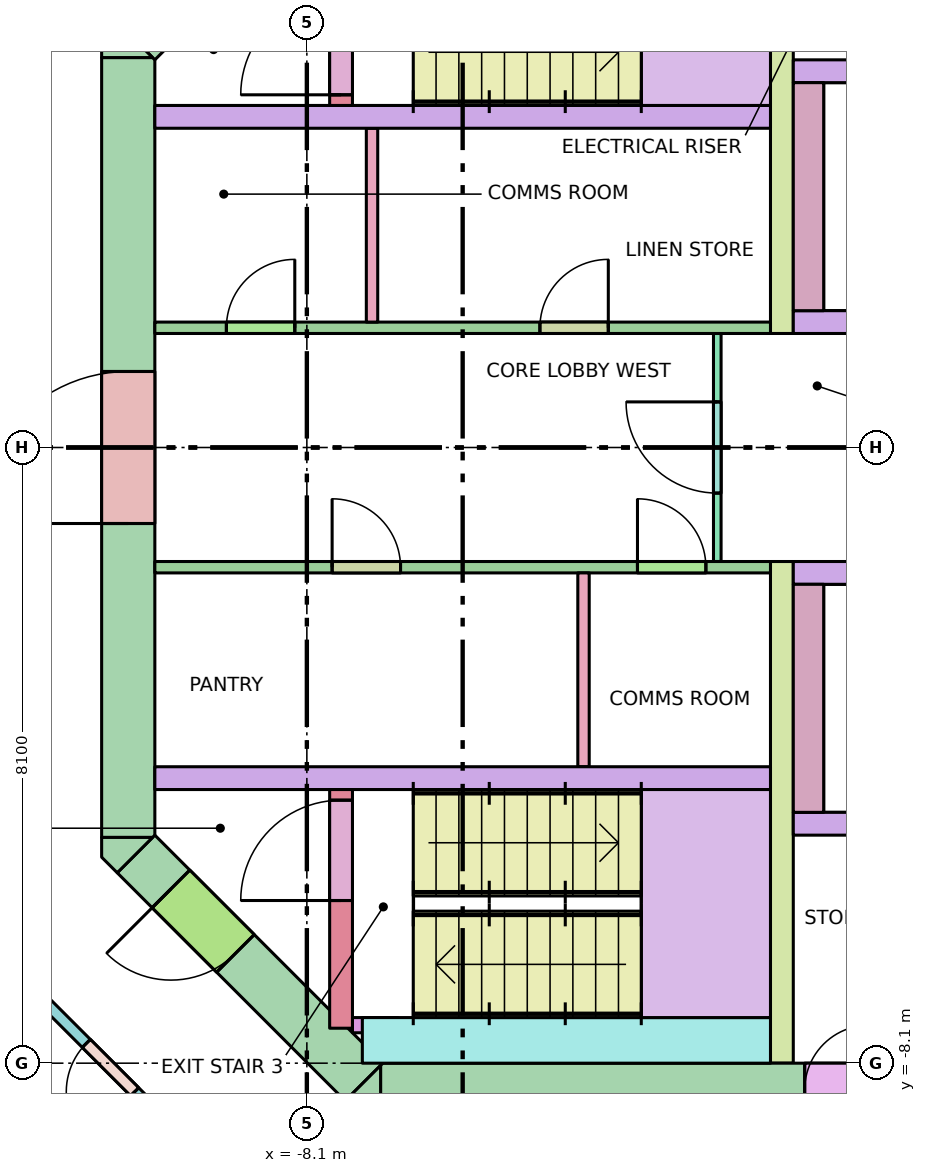
"""IFC4 building model, lengths in metres.
Left out: names, types, materials, properties, quantities, classifications, styles, units other than length and angle.
Written with IfcOpenShell. Run it as: python <this file> out.ifc"""

import sys

from ifc_helpers import new_model, si_unit, direction, frame, frame_2d, origin, place, context, subcontext, project, spatial, polyline, rectangle, outline, extrude, element, fill, save


model = new_model("IFC4")
c1 = context("Model", 3, precision=1e-05, world=origin(), true_north=direction((0.0, 1.0)))
c2 = subcontext(c1, "Body", "Model", "MODEL_VIEW")
j1 = project(units=[si_unit("LENGTHUNIT", "METRE"), si_unit("PLANEANGLEUNIT", "RADIAN")], contexts=[c1])
p1 = place(None, origin())
s1 = spatial("IfcSite", under=j1, at=p1, CompositionType="ELEMENT")
p2 = place(p1, origin())
s2 = spatial("IfcBuilding", under=s1, at=p2, CompositionType="ELEMENT")
p3 = place(p2, frame((0.0, 0.0, 226.1)))
s3 = spatial("IfcBuildingStorey", under=s2, at=p3, CompositionType="ELEMENT", Elevation=226.1)
p4 = place(p3, frame((-7.13, -8.45, -0.28), z_axis=(0.0, 0.0, 1.0), x_axis=(1.0, 0.0, 0.0)))
e1 = element("IfcWall", 1, at=p4, inside=s3, PredefinedType="SHEAR", context=c2, shape_type="SweptSolid", body=[
    extrude(rectangle(XDim=14.26, YDim=0.7, at=frame_2d((7.13, 0.0))), origin(), (0.0, 0.0, 1.0), 3.7),
])
p5 = place(p4, frame((8.08, 0.0, 0.28)))
e2 = element("IfcOpeningElement", 2, at=p5, cuts=e1, PredefinedType="OPENING", context=c2, shape_type="SweptSolid", body=[
    extrude(rectangle(XDim=0.7, YDim=2.1, at=frame_2d((0.35, 1.05))), frame((0.0, 0.36, 0.0), z_axis=(0.0, -1.0, 0.0), x_axis=(1.0, 0.0, 0.0)), (0.0, 0.0, 1.0), 0.72),
])
p6 = place(p4, frame((5.58, 0.0, 0.28)))
e3 = element("IfcOpeningElement", 3, at=p6, cuts=e1, PredefinedType="OPENING", context=c2, shape_type="SweptSolid", body=[
    extrude(rectangle(XDim=0.85, YDim=2.1, at=frame_2d((0.425, 1.05))), frame((0.0, 0.36, 0.0), z_axis=(0.0, -1.0, 0.0), x_axis=(1.0, 0.0, 0.0)), (0.0, 0.0, 1.0), 0.72),
])
p7 = place(p4, frame((6.88, 0.0, 0.28)))
e4 = element("IfcOpeningElement", 4, at=p7, cuts=e1, PredefinedType="OPENING", context=c2, shape_type="SweptSolid", body=[
    extrude(rectangle(XDim=0.85, YDim=2.1, at=frame_2d((0.425, 1.05))), frame((0.0, 0.36, 0.0), z_axis=(0.0, -1.0, 0.0), x_axis=(1.0, 0.0, 0.0)), (0.0, 0.0, 1.0), 0.72),
])
p8 = place(p4, frame((9.445, 0.0, 0.28)))
e5 = element("IfcOpeningElement", 5, at=p8, cuts=e1, PredefinedType="OPENING", context=c2, shape_type="SweptSolid", body=[
    extrude(rectangle(XDim=0.9, YDim=2.1, at=frame_2d((0.45, 1.05))), frame((0.0, 0.36, 0.0), z_axis=(0.0, -1.0, 0.0), x_axis=(1.0, 0.0, 0.0)), (0.0, 0.0, 1.0), 0.72),
])
p9 = place(p4, frame((11.431, 0.0, 0.28)))
e6 = element("IfcOpeningElement", 6, at=p9, cuts=e1, PredefinedType="OPENING", context=c2, shape_type="SweptSolid", body=[
    extrude(rectangle(XDim=0.9, YDim=2.1, at=frame_2d((0.45, 1.05))), frame((0.0, 0.36, 0.0), z_axis=(0.0, -1.0, 0.0), x_axis=(1.0, 0.0, 0.0)), (0.0, 0.0, 1.0), 0.72),
])
p10 = place(p3, frame((-10.45, -5.13, -0.28), z_axis=(0.0, 0.0, 1.0), x_axis=(0.0, 1.0, 0.0)))
e7 = element("IfcWall", 7, at=p10, inside=s3, PredefinedType="SHEAR", context=c2, shape_type="SweptSolid", body=[
    extrude(rectangle(XDim=10.26, YDim=0.7, at=frame_2d((5.13, 0.0))), origin(), (0.0, 0.0, 1.0), 3.7),
])
p11 = place(p10, frame((4.13, 0.0, 0.28)))
e8 = element("IfcOpeningElement", 8, at=p11, cuts=e7, PredefinedType="OPENING", context=c2, shape_type="SweptSolid", body=[
    extrude(rectangle(XDim=2.0, YDim=2.1, at=frame_2d((1.0, 1.05))), frame((0.0, 0.36, 0.0), z_axis=(0.0, -1.0, 0.0), x_axis=(1.0, 0.0, 0.0)), (0.0, 0.0, 1.0), 0.72),
])
p12 = place(p3, frame((-10.347, 5.347, -0.28), z_axis=(0.0, 0.0, 1.0), x_axis=(0.707106781187, 0.707106781187, 0.0)))
e9 = element("IfcWall", 9, at=p12, inside=s3, PredefinedType="SHEAR", context=c2, shape_type="SweptSolid", body=[
    extrude(rectangle(XDim=4.243, YDim=0.7, at=frame_2d((2.121, 0.0))), origin(), (0.0, 0.0, 1.0), 3.7),
])
p13 = place(p12, frame((0.65, 0.0, 0.28)))
e10 = element("IfcOpeningElement", 10, at=p13, cuts=e9, PredefinedType="OPENING", context=c2, shape_type="SweptSolid", body=[
    extrude(rectangle(XDim=1.2, YDim=2.1, at=frame_2d((0.6, 1.05))), frame((0.0, 0.36, 0.0), z_axis=(0.0, -1.0, 0.0), x_axis=(1.0, 0.0, 0.0)), (0.0, 0.0, 1.0), 0.72),
])
p14 = place(p3, frame((-7.347, -8.347, -0.28), z_axis=(0.0, 0.0, 1.0), x_axis=(-0.707106781187, 0.707106781187, 0.0)))
e11 = element("IfcWall", 11, at=p14, inside=s3, PredefinedType="SHEAR", context=c2, shape_type="SweptSolid", body=[
    extrude(rectangle(XDim=4.243, YDim=0.7, at=frame_2d((2.121, 0.0))), origin(), (0.0, 0.0, 1.0), 3.7),
])
p15 = place(p14, frame((2.393, 0.0, 0.28)))
e12 = element("IfcOpeningElement", 12, at=p15, cuts=e11, PredefinedType="OPENING", context=c2, shape_type="SweptSolid", body=[
    extrude(rectangle(XDim=1.2, YDim=2.1, at=frame_2d((0.6, 1.05))), frame((0.0, 0.36, 0.0), z_axis=(0.0, -1.0, 0.0), x_axis=(1.0, 0.0, 0.0)), (0.0, 0.0, 1.0), 0.72),
])
p16 = place(p3, frame((0.0, 0.0, -0.28)))
e13 = element("IfcWall", 13, at=p16, inside=s3, PredefinedType="SHEAR", context=c2, shape_type="SweptSolid", body=[
    extrude(outline(polyline([(-7.39, -8.8), (-7.595, -8.595), (-7.595, -8.595), (-7.595, -8.595), (-7.13, -8.13), (-7.13, -8.8), (-7.13, -8.8), (-7.39, -8.8)])), origin(), (0.0, 0.0, 1.0), 3.7),
])
p17 = place(p3, frame((0.0, 0.0, -0.28)))
e14 = element("IfcWall", 14, at=p17, inside=s3, PredefinedType="SHEAR", context=c2, shape_type="SweptSolid", body=[
    extrude(outline(polyline([(-10.8, -5.39), (-10.8, -5.13), (-10.8, -5.13), (-10.13, -5.13), (-10.595, -5.595), (-10.595, -5.595), (-10.595, -5.595), (-10.8, -5.39)])), origin(), (0.0, 0.0, 1.0), 3.7),
])
p18 = place(p3, frame((0.0, 0.0, -0.28)))
e15 = element("IfcWall", 15, at=p18, inside=s3, PredefinedType="SHEAR", context=c2, shape_type="SweptSolid", body=[
    extrude(outline(polyline([(-10.595, 5.595), (-10.595, 5.595), (-10.595, 5.595), (-10.13, 5.13), (-10.8, 5.13), (-10.8, 5.13), (-10.8, 5.39), (-10.595, 5.595)])), origin(), (0.0, 0.0, 1.0), 3.7),
])
for number, where, z_axis, x_axis in (
    (16, (-10.1, 4.35, 0.0), (0.0, 0.0, 1.0), (1.0, 0.0, 0.0)),
    (17, (-10.1, -4.35, 0.0), (0.0, 0.0, 1.0), (1.0, 0.0, 0.0)),
):
    element("IfcWall", number, at=place(p3, frame(where, z_axis=z_axis, x_axis=x_axis)), inside=s3, PredefinedType="SOLIDWALL", context=c2, shape_type="SweptSolid", body=[
        extrude(rectangle(XDim=8.1, YDim=0.3, at=frame_2d((4.05, 0.0))), origin(), (0.0, 0.0, 1.0), 3.42),
    ])
for number, where, z_axis, x_axis in (
    (18, (-1.85, 1.5, 0.0), (0.0, 0.0, 1.0), (0.0, 1.0, 0.0)),
    (19, (-1.85, -8.1, 0.0), (0.0, 0.0, 1.0), (0.0, 1.0, 0.0)),
):
    element("IfcWall", number, at=place(p3, frame(where, z_axis=z_axis, x_axis=x_axis)), inside=s3, PredefinedType="SHEAR", context=c2, shape_type="SweptSolid", body=[
        extrude(rectangle(XDim=6.6, YDim=0.3, at=frame_2d((3.3, 0.0))), origin(), (0.0, 0.0, 1.0), 3.42),
    ])
p19 = place(p3, frame((-1.7, 1.65, 0.0), z_axis=(0.0, 0.0, 1.0), x_axis=(1.0, 0.0, 0.0)))
e20 = element("IfcWall", 20, at=p19, inside=s3, PredefinedType="SOLIDWALL", context=c2, shape_type="SweptSolid", body=[
    extrude(rectangle(XDim=3.4, YDim=0.3, at=frame_2d((1.7, 0.0))), origin(), (0.0, 0.0, 1.0), 3.42),
])
p20 = place(p19, frame((1.15, 0.0, 0.0)))
e21 = element("IfcOpeningElement", 21, at=p20, cuts=e20, PredefinedType="OPENING", context=c2, shape_type="SweptSolid", body=[
    extrude(rectangle(XDim=1.1, YDim=2.1, at=frame_2d((0.55, 1.05))), frame((0.0, 0.16, 0.0), z_axis=(0.0, -1.0, 0.0), x_axis=(1.0, 0.0, 0.0)), (0.0, 0.0, 1.0), 0.32),
])
p21 = place(p3, frame((-1.7, -1.65, 0.0), z_axis=(0.0, 0.0, 1.0), x_axis=(1.0, 0.0, 0.0)))
e22 = element("IfcWall", 22, at=p21, inside=s3, PredefinedType="SOLIDWALL", context=c2, shape_type="SweptSolid", body=[
    extrude(rectangle(XDim=3.4, YDim=0.3, at=frame_2d((1.7, 0.0))), origin(), (0.0, 0.0, 1.0), 3.42),
])
p22 = place(p21, frame((1.15, 0.0, 0.0)))
e23 = element("IfcOpeningElement", 23, at=p22, cuts=e22, PredefinedType="OPENING", context=c2, shape_type="SweptSolid", body=[
    extrude(rectangle(XDim=1.1, YDim=2.1, at=frame_2d((0.55, 1.05))), frame((0.0, 0.16, 0.0), z_axis=(0.0, -1.0, 0.0), x_axis=(1.0, 0.0, 0.0)), (0.0, 0.0, 1.0), 0.32),
])
for number, where, z_axis, x_axis in (
    (24, (-1.5, 1.8, 0.0), (0.0, 0.0, 1.0), (0.0, 1.0, 0.0)),
    (25, (-1.5, -4.8, 0.0), (0.0, 0.0, 1.0), (0.0, 1.0, 0.0)),
):
    element("IfcWall", number, at=place(p3, frame(where, z_axis=z_axis, x_axis=x_axis)), inside=s3, PredefinedType="SOLIDWALL", context=c2, shape_type="SweptSolid", body=[
        extrude(rectangle(XDim=3.0, YDim=0.4, at=frame_2d((1.5, 0.0))), origin(), (0.0, 0.0, 1.0), 3.42),
    ])
for number, where, z_axis, x_axis in (
    (26, (-1.7, 4.95, 0.0), (0.0, 0.0, 1.0), (1.0, 0.0, 0.0)),
    (27, (-1.7, -4.95, 0.0), (0.0, 0.0, 1.0), (1.0, 0.0, 0.0)),
):
    element("IfcWall", number, at=place(p3, frame(where, z_axis=z_axis, x_axis=x_axis)), inside=s3, PredefinedType="SOLIDWALL", context=c2, shape_type="SweptSolid", body=[
        extrude(rectangle(XDim=3.4, YDim=0.3, at=frame_2d((1.7, 0.0))), origin(), (0.0, 0.0, 1.0), 3.42),
    ])
p23 = place(p3, frame((-7.65, 4.5, 0.0), z_axis=(0.0, 0.0, 1.0), x_axis=(0.0, 1.0, 0.0)))
e28 = element("IfcWall", 28, at=p23, inside=s3, PredefinedType="SHEAR", context=c2, shape_type="SweptSolid", body=[
    extrude(rectangle(XDim=3.14, YDim=0.3, at=frame_2d((1.57, 0.0))), origin(), (0.0, 0.0, 1.0), 3.42),
])
p24 = place(p23, frame((0.14, 0.0, 0.0)))
e29 = element("IfcOpeningElement", 29, at=p24, cuts=e28, PredefinedType="OPENING", context=c2, shape_type="SweptSolid", body=[
    extrude(rectangle(XDim=1.32, YDim=2.1, at=frame_2d((0.66, 1.05))), frame((0.0, 0.16, 0.0), z_axis=(0.0, -1.0, 0.0), x_axis=(1.0, 0.0, 0.0)), (0.0, 0.0, 1.0), 0.32),
])
p25 = place(p3, frame((-7.65, -7.64, 0.0), z_axis=(0.0, 0.0, 1.0), x_axis=(0.0, 1.0, 0.0)))
e30 = element("IfcWall", 30, at=p25, inside=s3, PredefinedType="SHEAR", context=c2, shape_type="SweptSolid", body=[
    extrude(rectangle(XDim=3.14, YDim=0.3, at=frame_2d((1.57, 0.0))), origin(), (0.0, 0.0, 1.0), 3.42),
])
p26 = place(p25, frame((1.68, 0.0, 0.0)))
e31 = element("IfcOpeningElement", 31, at=p26, cuts=e30, PredefinedType="OPENING", context=c2, shape_type="SweptSolid", body=[
    extrude(rectangle(XDim=1.32, YDim=2.1, at=frame_2d((0.66, 1.05))), frame((0.0, 0.16, 0.0), z_axis=(0.0, -1.0, 0.0), x_axis=(1.0, 0.0, 0.0)), (0.0, 0.0, 1.0), 0.32),
])
p27 = place(p3, frame((-7.5, -7.6, 0.0), z_axis=(0.0, 0.0, 1.0), x_axis=(1.0, 0.0, 0.0)))
e32 = element("IfcWall", 32, at=p27, inside=s3, PredefinedType="SHEAR", context=c2, shape_type="SweptSolid", body=[
    extrude(rectangle(XDim=0.6, YDim=0.2, at=frame_2d((0.3, 0.0))), origin(), (0.0, 0.0, 1.0), 3.42),
])
p28 = place(p3, frame((-7.37, -7.8, 0.0), z_axis=(0.0, 0.0, 1.0), x_axis=(1.0, 0.0, 0.0)))
e33 = element("IfcWall", 33, at=p28, inside=s3, PredefinedType="SHEAR", context=c2, shape_type="SweptSolid", body=[
    extrude(rectangle(XDim=5.37, YDim=0.6, at=frame_2d((2.685, 0.0))), origin(), (0.0, 0.0, 1.0), 3.42),
])
p29 = place(p3, frame((-2.7, -1.5, 0.0), z_axis=(0.0, 0.0, 1.0), x_axis=(0.0, 1.0, 0.0)))
e34 = element("IfcWall", 34, at=p29, inside=s3, PredefinedType="PARTITIONING", context=c2, shape_type="SweptSolid", body=[
    extrude(rectangle(XDim=3.0, YDim=0.1, at=frame_2d((1.5, 0.0))), origin(), (0.0, 0.0, 1.0), 3.42),
])
p30 = place(p29, frame((0.9, 0.0, 0.0)))
e35 = element("IfcOpeningElement", 35, at=p30, cuts=e34, PredefinedType="OPENING", context=c2, shape_type="SweptSolid", body=[
    extrude(rectangle(XDim=1.2, YDim=2.1, at=frame_2d((0.6, 1.05))), frame((0.0, 0.06, 0.0), z_axis=(0.0, -1.0, 0.0), x_axis=(1.0, 0.0, 0.0)), (0.0, 0.0, 1.0), 0.12),
])
for number, where, z_axis, x_axis in (
    (36, (-7.242, 1.65, 0.0), (0.0, 0.0, 1.0), (0.0, 1.0, 0.0)),
    (37, (-4.46, -4.2, 0.0), (0.0, 0.0, 1.0), (0.0, 1.0, 0.0)),
):
    element("IfcWall", number, at=place(p3, frame(where, z_axis=z_axis, x_axis=x_axis)), inside=s3, PredefinedType="PARTITIONING", context=c2, shape_type="SweptSolid", body=[
        extrude(rectangle(XDim=2.55, YDim=0.15, at=frame_2d((1.275, 0.0))), origin(), (0.0, 0.0, 1.0), 3.42),
    ])
p31 = place(p3, frame((-10.1, 1.575, 0.0), z_axis=(0.0, 0.0, 1.0), x_axis=(1.0, 0.0, 0.0)))
e38 = element("IfcWall", 38, at=p31, inside=s3, PredefinedType="PARTITIONING", context=c2, shape_type="SweptSolid", body=[
    extrude(rectangle(XDim=8.1, YDim=0.15, at=frame_2d((4.05, 0.0))), origin(), (0.0, 0.0, 1.0), 3.42),
])
p32 = place(p31, frame((0.941, 0.0, 0.0)))
e39 = element("IfcOpeningElement", 39, at=p32, cuts=e38, PredefinedType="OPENING", context=c2, shape_type="SweptSolid", body=[
    extrude(rectangle(XDim=0.9, YDim=2.1, at=frame_2d((0.45, 1.05))), frame((0.0, 0.085, 0.0), z_axis=(0.0, -1.0, 0.0), x_axis=(1.0, 0.0, 0.0)), (0.0, 0.0, 1.0), 0.17),
])
p33 = place(p31, frame((5.066, 0.0, 0.0)))
e40 = element("IfcOpeningElement", 40, at=p33, cuts=e38, PredefinedType="OPENING", context=c2, shape_type="SweptSolid", body=[
    extrude(rectangle(XDim=0.9, YDim=2.1, at=frame_2d((0.45, 1.05))), frame((0.0, 0.085, 0.0), z_axis=(0.0, -1.0, 0.0), x_axis=(1.0, 0.0, 0.0)), (0.0, 0.0, 1.0), 0.17),
])
p34 = place(p3, frame((-10.1, -1.575, 0.0), z_axis=(0.0, 0.0, 1.0), x_axis=(1.0, 0.0, 0.0)))
e41 = element("IfcWall", 41, at=p34, inside=s3, PredefinedType="PARTITIONING", context=c2, shape_type="SweptSolid", body=[
    extrude(rectangle(XDim=8.1, YDim=0.15, at=frame_2d((4.05, 0.0))), origin(), (0.0, 0.0, 1.0), 3.42),
])
p35 = place(p34, frame((2.333, 0.0, 0.0)))
e42 = element("IfcOpeningElement", 42, at=p35, cuts=e41, PredefinedType="OPENING", context=c2, shape_type="SweptSolid", body=[
    extrude(rectangle(XDim=0.9, YDim=2.1, at=frame_2d((0.45, 1.05))), frame((0.0, 0.085, 0.0), z_axis=(0.0, -1.0, 0.0), x_axis=(1.0, 0.0, 0.0)), (0.0, 0.0, 1.0), 0.17),
])
p36 = place(p34, frame((6.35, 0.0, 0.0)))
e43 = element("IfcOpeningElement", 43, at=p36, cuts=e41, PredefinedType="OPENING", context=c2, shape_type="SweptSolid", body=[
    extrude(rectangle(XDim=0.9, YDim=2.1, at=frame_2d((0.45, 1.05))), frame((0.0, 0.085, 0.0), z_axis=(0.0, -1.0, 0.0), x_axis=(1.0, 0.0, 0.0)), (0.0, 0.0, 1.0), 0.17),
])
p37 = place(p3, frame((-8.204, -10.638, 0.0), z_axis=(0.0, 0.0, 1.0), x_axis=(-0.707106781187, 0.707106781187, 0.0)))
e44 = element("IfcWall", 44, at=p37, inside=s3, PredefinedType="PARTITIONING", context=c2, shape_type="SweptSolid", body=[
    extrude(rectangle(XDim=6.271, YDim=0.15, at=frame_2d((3.135, 0.0))), origin(), (0.0, 0.0, 1.0), 2.57),
])
p38 = place(p37, frame((3.057, 0.0, 0.0)))
e45 = element("IfcOpeningElement", 45, at=p38, cuts=e44, PredefinedType="OPENING", context=c2, shape_type="SweptSolid", body=[
    extrude(rectangle(XDim=0.9, YDim=2.1, at=frame_2d((0.45, 1.05))), frame((0.0, 0.085, 0.0), z_axis=(0.0, -1.0, 0.0), x_axis=(1.0, 0.0, 0.0)), (0.0, 0.0, 1.0), 0.17),
])
p39 = place(p24, origin())
e46 = element("IfcDoor", 46, at=p39, inside=s3, OperationType="DOUBLE_DOOR_SINGLE_SWING", PredefinedType="DOOR", context=c2, shape_type="SweptSolid", body=[
    extrude(rectangle(XDim=1.32, YDim=2.1, at=frame_2d((0.66, 1.05))), frame((0.0, 0.025, 0.0), z_axis=(0.0, -1.0, 0.0), x_axis=(1.0, 0.0, 0.0)), (0.0, 0.0, 1.0), 0.05),
])
fill(e29, e46)
p40 = place(p26, origin())
e47 = element("IfcDoor", 47, at=p40, inside=s3, OperationType="DOUBLE_DOOR_SINGLE_SWING", PredefinedType="DOOR", context=c2, shape_type="SweptSolid", body=[
    extrude(rectangle(XDim=1.32, YDim=2.1, at=frame_2d((0.66, 1.05))), frame((0.0, 0.025, 0.0), z_axis=(0.0, -1.0, 0.0), x_axis=(1.0, 0.0, 0.0)), (0.0, 0.0, 1.0), 0.05),
])
fill(e31, e47)
p41 = place(p15, origin())
e48 = element("IfcDoor", 48, at=p41, inside=s3, OperationType="SINGLE_SWING_RIGHT", PredefinedType="DOOR", context=c2, shape_type="SweptSolid", body=[
    extrude(rectangle(XDim=1.2, YDim=2.1, at=frame_2d((0.6, 1.05))), frame((0.0, 0.025, 0.0), z_axis=(0.0, -1.0, 0.0), x_axis=(1.0, 0.0, 0.0)), (0.0, 0.0, 1.0), 0.05),
])
fill(e12, e48)
p42 = place(p11, origin())
e49 = element("IfcDoor", 49, at=p42, inside=s3, OperationType="DOUBLE_DOOR_SINGLE_SWING", PredefinedType="DOOR", context=c2, shape_type="SweptSolid", body=[
    extrude(rectangle(XDim=2.0, YDim=2.1, at=frame_2d((1.0, 1.05))), frame((0.0, 0.025, 0.0), z_axis=(0.0, -1.0, 0.0), x_axis=(1.0, 0.0, 0.0)), (0.0, 0.0, 1.0), 0.05),
])
fill(e8, e49)
p43 = place(p30, origin())
e50 = element("IfcDoor", 50, at=p43, inside=s3, OperationType="SINGLE_SWING_RIGHT", PredefinedType="DOOR", context=c2, shape_type="SweptSolid", body=[
    extrude(rectangle(XDim=1.2, YDim=2.1, at=frame_2d((0.6, 1.05))), frame((0.0, 0.025, 0.0), z_axis=(0.0, -1.0, 0.0), x_axis=(1.0, 0.0, 0.0)), (0.0, 0.0, 1.0), 0.05),
])
fill(e35, e50)
p44 = place(p6, origin())
e51 = element("IfcDoor", 51, at=p44, inside=s3, OperationType="SINGLE_SWING_RIGHT", PredefinedType="DOOR", context=c2, shape_type="SweptSolid", body=[
    extrude(rectangle(XDim=0.85, YDim=2.1, at=frame_2d((0.425, 1.05))), frame((0.0, 0.025, 0.0), z_axis=(0.0, -1.0, 0.0), x_axis=(1.0, 0.0, 0.0)), (0.0, 0.0, 1.0), 0.05),
])
fill(e3, e51)
p45 = place(p32, origin())
e52 = element("IfcDoor", 52, at=p45, inside=s3, OperationType="SINGLE_SWING_RIGHT", PredefinedType="DOOR", context=c2, shape_type="SweptSolid", body=[
    extrude(rectangle(XDim=0.9, YDim=2.1, at=frame_2d((0.45, 1.05))), frame((0.0, 0.025, 0.0), z_axis=(0.0, -1.0, 0.0), x_axis=(1.0, 0.0, 0.0)), (0.0, 0.0, 1.0), 0.05),
])
fill(e39, e52)
p46 = place(p33, origin())
e53 = element("IfcDoor", 53, at=p46, inside=s3, OperationType="SINGLE_SWING_RIGHT", PredefinedType="DOOR", context=c2, shape_type="SweptSolid", body=[
    extrude(rectangle(XDim=0.9, YDim=2.1, at=frame_2d((0.45, 1.05))), frame((0.0, 0.025, 0.0), z_axis=(0.0, -1.0, 0.0), x_axis=(1.0, 0.0, 0.0)), (0.0, 0.0, 1.0), 0.05),
])
fill(e40, e53)
p47 = place(p35, origin())
e54 = element("IfcDoor", 54, at=p47, inside=s3, OperationType="SINGLE_SWING_LEFT", PredefinedType="DOOR", context=c2, shape_type="SweptSolid", body=[
    extrude(rectangle(XDim=0.9, YDim=2.1, at=frame_2d((0.45, 1.05))), frame((0.0, 0.025, 0.0), z_axis=(0.0, -1.0, 0.0), x_axis=(1.0, 0.0, 0.0)), (0.0, 0.0, 1.0), 0.05),
])
fill(e42, e54)
p48 = place(p36, origin())
e55 = element("IfcDoor", 55, at=p48, inside=s3, OperationType="SINGLE_SWING_LEFT", PredefinedType="DOOR", context=c2, shape_type="SweptSolid", body=[
    extrude(rectangle(XDim=0.9, YDim=2.1, at=frame_2d((0.45, 1.05))), frame((0.0, 0.025, 0.0), z_axis=(0.0, -1.0, 0.0), x_axis=(1.0, 0.0, 0.0)), (0.0, 0.0, 1.0), 0.05),
])
fill(e43, e55)
p49 = place(p38, origin())
e56 = element("IfcDoor", 56, at=p49, inside=s3, OperationType="SINGLE_SWING_LEFT", PredefinedType="DOOR", context=c2, shape_type="SweptSolid", body=[
    extrude(rectangle(XDim=0.9, YDim=2.1, at=frame_2d((0.45, 1.05))), frame((0.0, 0.025, 0.0), z_axis=(0.0, -1.0, 0.0), x_axis=(1.0, 0.0, 0.0)), (0.0, 0.0, 1.0), 0.05),
])
fill(e45, e56)
save(model, sys.argv[1])
